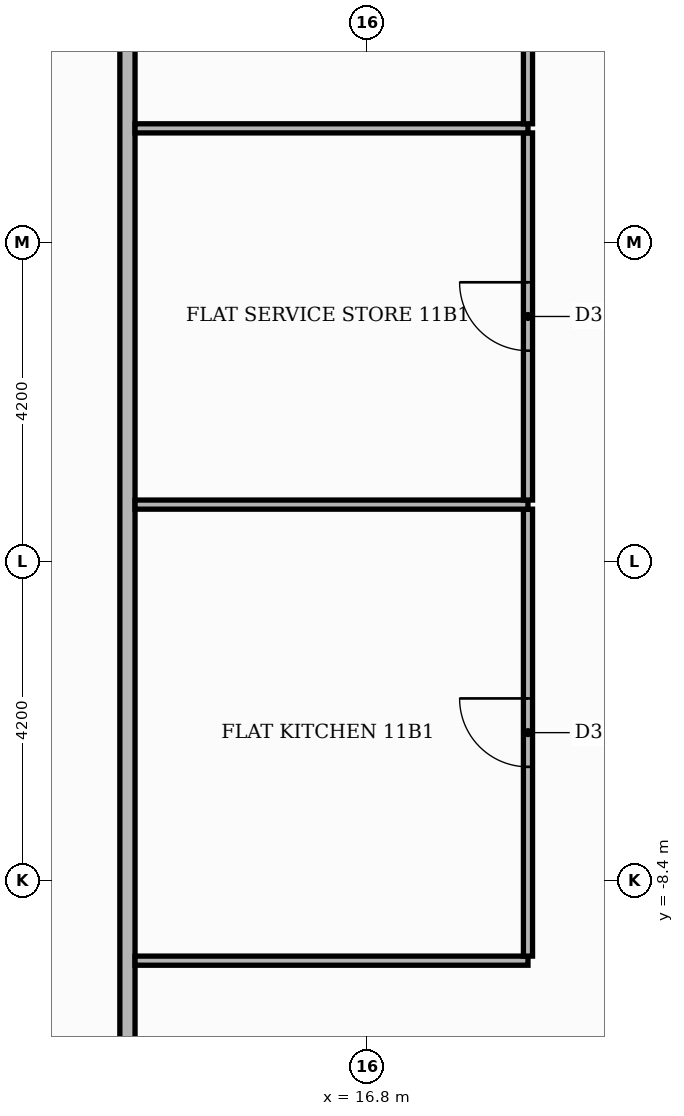
"""IFC4 building model, lengths in metres.
Left out: names, types, materials, properties, quantities, classifications, styles, units other than length and angle.
Written with IfcOpenShell. Run it as: python <this file> out.ifc"""

import sys

from ifc_helpers import new_model, si_unit, direction, frame, frame_2d, origin, place, context, subcontext, project, spatial, rectangle, extrude, element, fill, save


model = new_model("IFC4")
c1 = context("Model", 3, precision=1e-05, world=origin(), true_north=direction((0.0, 1.0)))
c2 = subcontext(c1, "Body", "Model", "MODEL_VIEW")
j1 = project(units=[si_unit("LENGTHUNIT", "METRE"), si_unit("PLANEANGLEUNIT", "RADIAN")], contexts=[c1])
p1 = place(None, origin())
s1 = spatial("IfcSite", under=j1, at=p1, CompositionType="ELEMENT")
p2 = place(p1, origin())
s2 = spatial("IfcBuilding", under=s1, at=p2, CompositionType="ELEMENT")
p3 = place(p2, frame((0.0, 0.0, 50.4)))
s3 = spatial("IfcBuildingStorey", under=s2, at=p3, CompositionType="ELEMENT", Elevation=50.4)
p4 = place(p3, frame((13.65, -13.55, 0.0), z_axis=(0.0, 0.0, 1.0), x_axis=(0.0, 1.0, 0.0)))
e1 = element("IfcWall", 1, at=p4, inside=s3, PredefinedType="PARTITIONING", context=c2, shape_type="SweptSolid", body=[
    extrude(rectangle(XDim=27.1, YDim=0.2, at=frame_2d((13.55, 0.0))), origin(), (0.0, 0.0, 1.0), 3.48),
])
p5 = place(p4, frame((1.45, 0.0, 0.0)))
e2 = element("IfcOpeningElement", 2, at=p5, cuts=e1, PredefinedType="OPENING", context=c2, shape_type="SweptSolid", body=[
    extrude(rectangle(XDim=1.1, YDim=2.4, at=frame_2d((0.55, 1.2))), frame((0.0, 0.11, 0.0), z_axis=(0.0, -1.0, 0.0), x_axis=(1.0, 0.0, 0.0)), (0.0, 0.0, 1.0), 0.22),
])
p6 = place(p3, frame((13.75, -9.45, 0.0), z_axis=(0.0, 0.0, 1.0), x_axis=(1.0, 0.0, 0.0)))
e3 = element("IfcWall", 3, at=p6, inside=s3, PredefinedType="PARTITIONING", context=c2, shape_type="SweptSolid", body=[
    extrude(rectangle(XDim=5.17, YDim=0.12, at=frame_2d((2.585, 0.0))), origin(), (0.0, 0.0, 1.0), 3.48),
])
p7 = place(p3, frame((18.92, -9.39, 0.0), z_axis=(0.0, 0.0, 1.0), x_axis=(0.0, 1.0, 0.0)))
e4 = element("IfcWall", 4, at=p7, inside=s3, PredefinedType="PARTITIONING", context=c2, shape_type="SweptSolid", body=[
    extrude(rectangle(XDim=5.88, YDim=0.12, at=frame_2d((2.94, 0.0))), origin(), (0.0, 0.0, 1.0), 3.48),
])
p8 = place(p7, frame((2.49, 0.0, 0.0)))
e5 = element("IfcOpeningElement", 5, at=p8, cuts=e4, PredefinedType="OPENING", context=c2, shape_type="SweptSolid", body=[
    extrude(rectangle(XDim=0.9, YDim=2.1, at=frame_2d((0.45, 1.05))), frame((0.0, 0.07, 0.0), z_axis=(0.0, -1.0, 0.0), x_axis=(1.0, 0.0, 0.0)), (0.0, 0.0, 1.0), 0.14),
])
p9 = place(p3, frame((13.75, -3.45, 0.0), z_axis=(0.0, 0.0, 1.0), x_axis=(1.0, 0.0, 0.0)))
e6 = element("IfcWall", 6, at=p9, inside=s3, PredefinedType="PARTITIONING", context=c2, shape_type="SweptSolid", body=[
    extrude(rectangle(XDim=5.17, YDim=0.12, at=frame_2d((2.585, 0.0))), origin(), (0.0, 0.0, 1.0), 3.48),
])
p10 = place(p3, frame((18.92, -3.39, 0.0), z_axis=(0.0, 0.0, 1.0), x_axis=(0.0, 1.0, 0.0)))
e7 = element("IfcWall", 7, at=p10, inside=s3, PredefinedType="PARTITIONING", context=c2, shape_type="SweptSolid", body=[
    extrude(rectangle(XDim=4.83, YDim=0.12, at=frame_2d((2.415, 0.0))), origin(), (0.0, 0.0, 1.0), 3.48),
])
p11 = place(p10, frame((1.965, 0.0, 0.0)))
e8 = element("IfcOpeningElement", 8, at=p11, cuts=e7, PredefinedType="OPENING", context=c2, shape_type="SweptSolid", body=[
    extrude(rectangle(XDim=0.9, YDim=2.1, at=frame_2d((0.45, 1.05))), frame((0.0, 0.07, 0.0), z_axis=(0.0, -1.0, 0.0), x_axis=(1.0, 0.0, 0.0)), (0.0, 0.0, 1.0), 0.14),
])
p12 = place(p3, frame((13.75, 1.5, 0.0), z_axis=(0.0, 0.0, 1.0), x_axis=(1.0, 0.0, 0.0)))
e9 = element("IfcWall", 9, at=p12, inside=s3, PredefinedType="PARTITIONING", context=c2, shape_type="SweptSolid", body=[
    extrude(rectangle(XDim=5.17, YDim=0.12, at=frame_2d((2.585, 0.0))), origin(), (0.0, 0.0, 1.0), 3.48),
])
p13 = place(p3, frame((18.92, 1.56, 0.0), z_axis=(0.0, 0.0, 1.0), x_axis=(0.0, 1.0, 0.0)))
e10 = element("IfcWall", 10, at=p13, inside=s3, PredefinedType="PARTITIONING", context=c2, shape_type="SweptSolid", body=[
    extrude(rectangle(XDim=5.58, YDim=0.12, at=frame_2d((2.79, 0.0))), origin(), (0.0, 0.0, 1.0), 3.48),
])
p14 = place(p13, frame((2.34, 0.0, 0.0)))
e11 = element("IfcOpeningElement", 11, at=p14, cuts=e10, PredefinedType="OPENING", context=c2, shape_type="SweptSolid", body=[
    extrude(rectangle(XDim=0.9, YDim=2.1, at=frame_2d((0.45, 1.05))), frame((0.0, 0.07, 0.0), z_axis=(0.0, -1.0, 0.0), x_axis=(1.0, 0.0, 0.0)), (0.0, 0.0, 1.0), 0.14),
])
p15 = place(p8, origin())
e12 = element("IfcDoor", 12, at=p15, inside=s3, OperationType="SINGLE_SWING_RIGHT", PredefinedType="DOOR", context=c2, shape_type="SweptSolid", body=[
    extrude(rectangle(XDim=0.9, YDim=2.1, at=frame_2d((0.45, 1.05))), frame((0.0, 0.025, 0.0), z_axis=(0.0, -1.0, 0.0), x_axis=(1.0, 0.0, 0.0)), (0.0, 0.0, 1.0), 0.05),
])
fill(e5, e12)
p16 = place(p11, origin())
e13 = element("IfcDoor", 13, at=p16, inside=s3, OperationType="SINGLE_SWING_RIGHT", PredefinedType="DOOR", context=c2, shape_type="SweptSolid", body=[
    extrude(rectangle(XDim=0.9, YDim=2.1, at=frame_2d((0.45, 1.05))), frame((0.0, 0.025, 0.0), z_axis=(0.0, -1.0, 0.0), x_axis=(1.0, 0.0, 0.0)), (0.0, 0.0, 1.0), 0.05),
])
fill(e8, e13)
save(model, sys.argv[1])
